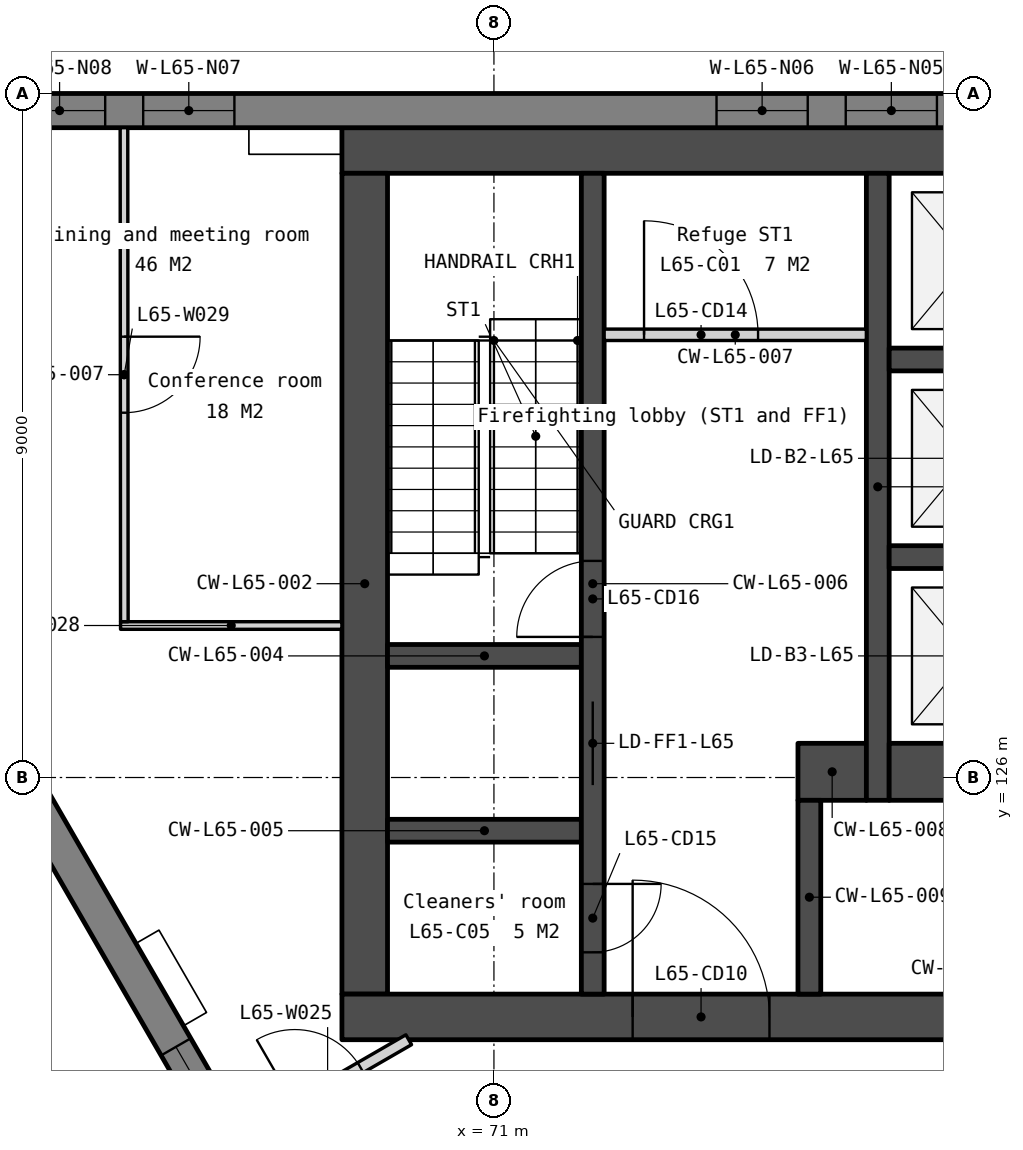
"""IFC4 building model, lengths in metres.
Left out: names, types, materials, properties, quantities, classifications, styles, units other than length and angle.
Written with IfcOpenShell. Run it as: python <this file> out.ifc"""

import sys

from ifc_helpers import new_model, si_unit, direction, frame, frame_2d, origin, place, context, subcontext, project, spatial, polyline, rectangle, outline, extrude, element, fill, save


model = new_model("IFC4")
c1 = context("Model", 3, precision=1e-05, world=origin(), true_north=direction((0.0, 1.0)))
c2 = subcontext(c1, "Body", "Model", "MODEL_VIEW")
j1 = project(units=[si_unit("LENGTHUNIT", "METRE"), si_unit("PLANEANGLEUNIT", "RADIAN")], contexts=[c1])
p1 = place(None, origin())
s1 = spatial("IfcSite", under=j1, at=p1, CompositionType="ELEMENT")
p2 = place(p1, origin())
s2 = spatial("IfcBuilding", under=s1, at=p2, CompositionType="ELEMENT")
p3 = place(p2, frame((0.0, 0.0, 266.0)))
s3 = spatial("IfcBuildingStorey", under=s2, at=p3, CompositionType="ELEMENT", Elevation=266.0)
p4 = place(p3, frame((69.0, 134.25, 0.0), z_axis=(0.0, 0.0, 1.0), x_axis=(1.0, 0.0, 0.0)))
e1 = element("IfcWall", 1, at=p4, inside=s3, PredefinedType="SOLIDWALL", context=c2, shape_type="SweptSolid", body=[
    extrude(rectangle(XDim=22.0, YDim=0.6, at=frame_2d((11.0, 0.0))), origin(), (0.0, 0.0, 1.0), 3.75),
])
p5 = place(p3, frame((69.3, 133.95, 0.0), z_axis=(0.0, 0.0, 1.0), x_axis=(0.0, -1.0, 0.0)))
e2 = element("IfcWall", 2, at=p5, inside=s3, PredefinedType="SOLIDWALL", context=c2, shape_type="SweptSolid", body=[
    extrude(rectangle(XDim=10.8, YDim=0.6, at=frame_2d((5.4, 0.0))), origin(), (0.0, 0.0, 1.0), 3.75),
])
p6 = place(p3, frame((69.0, 122.85, 0.0), z_axis=(0.0, 0.0, 1.0), x_axis=(1.0, 0.0, 0.0)))
e3 = element("IfcWall", 3, at=p6, inside=s3, PredefinedType="SOLIDWALL", context=c2, shape_type="SweptSolid", body=[
    extrude(rectangle(XDim=22.0, YDim=0.6, at=frame_2d((11.0, 0.0))), origin(), (0.0, 0.0, 1.0), 3.75),
])
p7 = place(p6, frame((16.375, 0.0, 0.0)))
e4 = element("IfcOpeningElement", 4, at=p7, cuts=e3, PredefinedType="OPENING", context=c2, shape_type="SweptSolid", body=[
    extrude(rectangle(XDim=1.8, YDim=2.1, at=frame_2d((0.9, 1.05))), frame((0.0, 0.31, 0.0), z_axis=(0.0, -1.0, 0.0), x_axis=(1.0, 0.0, 0.0)), (0.0, 0.0, 1.0), 0.62),
])
p8 = place(p6, frame((3.825, 0.0, 0.0)))
e5 = element("IfcOpeningElement", 5, at=p8, cuts=e3, PredefinedType="OPENING", context=c2, shape_type="SweptSolid", body=[
    extrude(rectangle(XDim=1.8, YDim=2.1, at=frame_2d((0.9, 1.05))), frame((0.0, 0.31, 0.0), z_axis=(0.0, -1.0, 0.0), x_axis=(1.0, 0.0, 0.0)), (0.0, 0.0, 1.0), 0.62),
])
p9 = place(p6, frame((12.85, 0.0, 0.0)))
e6 = element("IfcOpeningElement", 6, at=p9, cuts=e3, PredefinedType="OPENING", context=c2, shape_type="SweptSolid", body=[
    extrude(rectangle(XDim=1.5, YDim=2.1, at=frame_2d((0.75, 1.05))), frame((0.0, 0.31, 0.0), z_axis=(0.0, -1.0, 0.0), x_axis=(1.0, 0.0, 0.0)), (0.0, 0.0, 1.0), 0.62),
])
for number, where, z_axis, x_axis in (
    (7, (69.6, 127.6, 0.0), (0.0, 0.0, 1.0), (1.0, 0.0, 0.0)),
    (8, (69.6, 125.3, 0.0), (0.0, 0.0, 1.0), (1.0, 0.0, 0.0)),
):
    element("IfcWall", number, at=place(p3, frame(where, z_axis=z_axis, x_axis=x_axis)), inside=s3, PredefinedType="SOLIDWALL", context=c2, shape_type="SweptSolid", body=[
        extrude(rectangle(XDim=2.55, YDim=0.3, at=frame_2d((1.275, 0.0))), origin(), (0.0, 0.0, 1.0), 3.75),
    ])
p10 = place(p3, frame((72.3, 133.95, 0.0), z_axis=(0.0, 0.0, 1.0), x_axis=(0.0, -1.0, 0.0)))
e9 = element("IfcWall", 9, at=p10, inside=s3, PredefinedType="SOLIDWALL", context=c2, shape_type="SweptSolid", body=[
    extrude(rectangle(XDim=10.8, YDim=0.3, at=frame_2d((5.4, 0.0))), origin(), (0.0, 0.0, 1.0), 3.75),
])
p11 = place(p10, frame((6.95, 0.0, 0.0)))
e10 = element("IfcOpeningElement", 10, at=p11, cuts=e9, PredefinedType="OPENING", context=c2, shape_type="SweptSolid", body=[
    extrude(rectangle(XDim=1.1, YDim=2.1, at=frame_2d((0.55, 1.05))), frame((0.0, 0.16, 0.0), z_axis=(0.0, -1.0, 0.0), x_axis=(1.0, 0.0, 0.0)), (0.0, 0.0, 1.0), 0.32),
])
p12 = place(p10, frame((9.35, 0.0, 0.0)))
e11 = element("IfcOpeningElement", 11, at=p12, cuts=e9, PredefinedType="OPENING", context=c2, shape_type="SweptSolid", body=[
    extrude(rectangle(XDim=0.9, YDim=2.1, at=frame_2d((0.45, 1.05))), frame((0.0, 0.16, 0.0), z_axis=(0.0, -1.0, 0.0), x_axis=(1.0, 0.0, 0.0)), (0.0, 0.0, 1.0), 0.32),
])
p13 = place(p10, frame((5.1, 0.0, 0.0)))
e12 = element("IfcOpeningElement", 12, at=p13, cuts=e9, PredefinedType="OPENING", context=c2, shape_type="SweptSolid", body=[
    extrude(rectangle(XDim=1.0, YDim=2.1, at=frame_2d((0.5, 1.05))), frame((0.0, 0.16, 0.0), z_axis=(0.0, -1.0, 0.0), x_axis=(1.0, 0.0, 0.0)), (0.0, 0.0, 1.0), 0.32),
])
p14 = place(p3, frame((72.45, 131.825, 0.0), z_axis=(0.0, 0.0, 1.0), x_axis=(1.0, 0.0, 0.0)))
e13 = element("IfcWall", 13, at=p14, inside=s3, PredefinedType="PARTITIONING", context=c2, shape_type="SweptSolid", body=[
    extrude(rectangle(XDim=3.45, YDim=0.15, at=frame_2d((1.725, 0.0))), origin(), (0.0, 0.0, 1.0), 3.75),
])
p15 = place(p14, frame((0.525, 0.0, 0.0)))
e14 = element("IfcOpeningElement", 14, at=p15, cuts=e13, PredefinedType="OPENING", context=c2, shape_type="SweptSolid", body=[
    extrude(rectangle(XDim=1.5, YDim=2.1, at=frame_2d((0.75, 1.05))), frame((0.0, 0.085, 0.0), z_axis=(0.0, -1.0, 0.0), x_axis=(1.0, 0.0, 0.0)), (0.0, 0.0, 1.0), 0.17),
])
p16 = place(p3, frame((75.0, 126.075, 0.0), z_axis=(0.0, 0.0, 1.0), x_axis=(1.0, 0.0, 0.0)))
e15 = element("IfcWall", 15, at=p16, inside=s3, PredefinedType="SOLIDWALL", context=c2, shape_type="SweptSolid", body=[
    extrude(rectangle(XDim=0.9, YDim=0.75, at=frame_2d((0.45, 0.0))), origin(), (0.0, 0.0, 1.0), 3.75),
])
p17 = place(p3, frame((75.15, 125.7, 0.0), z_axis=(0.0, 0.0, 1.0), x_axis=(0.0, -1.0, 0.0)))
e16 = element("IfcWall", 16, at=p17, inside=s3, PredefinedType="SOLIDWALL", context=c2, shape_type="SweptSolid", body=[
    extrude(rectangle(XDim=2.55, YDim=0.3, at=frame_2d((1.275, 0.0))), origin(), (0.0, 0.0, 1.0), 3.75),
])
p18 = place(p3, frame((76.05, 133.95, 0.0), z_axis=(0.0, 0.0, 1.0), x_axis=(0.0, -1.0, 0.0)))
e17 = element("IfcWall", 17, at=p18, inside=s3, PredefinedType="SOLIDWALL", context=c2, shape_type="SweptSolid", body=[
    extrude(rectangle(XDim=8.25, YDim=0.3, at=frame_2d((4.125, 0.0))), origin(), (0.0, 0.0, 1.0), 3.75),
])
for number, where, z_axis, x_axis in (
    (18, (76.2, 131.5, 0.0), (0.0, 0.0, 1.0), (1.0, 0.0, 0.0)),
    (19, (76.2, 128.9, 0.0), (0.0, 0.0, 1.0), (1.0, 0.0, 0.0)),
):
    element("IfcWall", number, at=place(p3, frame(where, z_axis=z_axis, x_axis=x_axis)), inside=s3, PredefinedType="SOLIDWALL", context=c2, shape_type="SweptSolid", body=[
        extrude(rectangle(XDim=2.1, YDim=0.3, at=frame_2d((1.05, 0.0))), origin(), (0.0, 0.0, 1.0), 3.75),
    ])
p19 = place(p3, frame((76.2, 126.075, 0.0), z_axis=(0.0, 0.0, 1.0), x_axis=(1.0, 0.0, 0.0)))
e20 = element("IfcWall", 20, at=p19, inside=s3, PredefinedType="SOLIDWALL", context=c2, shape_type="SweptSolid", body=[
    extrude(rectangle(XDim=2.1, YDim=0.75, at=frame_2d((1.05, 0.0))), origin(), (0.0, 0.0, 1.0), 3.75),
])
p20 = place(p3, frame((98.486, 134.775, -0.15), z_axis=(0.0, 0.0, 1.0), x_axis=(-1.0, 0.0, 0.0)))
e21 = element("IfcWall", 21, at=p20, inside=s3, PredefinedType="SOLIDWALL", context=c2, shape_type="SweptSolid", body=[
    extrude(outline(polyline([(36.972, 0.0), (36.972, 3.9), (0.0, 3.9), (0.0, 0.0), (36.972, 0.0)])), frame((0.0, 0.225, 0.0), z_axis=(0.0, -1.0, 0.0), x_axis=(1.0, 0.0, 0.0)), (0.0, 0.0, 1.0), 0.45),
])
p21 = place(p20, frame((3.172, 0.0, 0.95)))
e22 = element("IfcOpeningElement", 22, at=p21, cuts=e21, PredefinedType="OPENING", context=c2, shape_type="SweptSolid", body=[
    extrude(rectangle(XDim=1.2, YDim=2.2, at=frame_2d((0.6, 1.1))), frame((0.0, 0.235, 0.0), z_axis=(0.0, -1.0, 0.0), x_axis=(1.0, 0.0, 0.0)), (0.0, 0.0, 1.0), 0.47),
])
p22 = place(p20, frame((4.872, 0.0, 0.95)))
e23 = element("IfcOpeningElement", 23, at=p22, cuts=e21, PredefinedType="OPENING", context=c2, shape_type="SweptSolid", body=[
    extrude(rectangle(XDim=1.2, YDim=2.2, at=frame_2d((0.6, 1.1))), frame((0.0, 0.235, 0.0), z_axis=(0.0, -1.0, 0.0), x_axis=(1.0, 0.0, 0.0)), (0.0, 0.0, 1.0), 0.47),
])
p23 = place(p20, frame((12.415, 0.0, 0.95)))
e24 = element("IfcOpeningElement", 24, at=p23, cuts=e21, PredefinedType="OPENING", context=c2, shape_type="SweptSolid", body=[
    extrude(rectangle(XDim=1.2, YDim=2.2, at=frame_2d((0.6, 1.1))), frame((0.0, 0.235, 0.0), z_axis=(0.0, -1.0, 0.0), x_axis=(1.0, 0.0, 0.0)), (0.0, 0.0, 1.0), 0.47),
])
p24 = place(p20, frame((14.115, 0.0, 0.95)))
e25 = element("IfcOpeningElement", 25, at=p24, cuts=e21, PredefinedType="OPENING", context=c2, shape_type="SweptSolid", body=[
    extrude(rectangle(XDim=1.2, YDim=2.2, at=frame_2d((0.6, 1.1))), frame((0.0, 0.235, 0.0), z_axis=(0.0, -1.0, 0.0), x_axis=(1.0, 0.0, 0.0)), (0.0, 0.0, 1.0), 0.47),
])
p25 = place(p20, frame((21.658, 0.0, 0.95)))
e26 = element("IfcOpeningElement", 26, at=p25, cuts=e21, PredefinedType="OPENING", context=c2, shape_type="SweptSolid", body=[
    extrude(rectangle(XDim=1.2, YDim=2.2, at=frame_2d((0.6, 1.1))), frame((0.0, 0.235, 0.0), z_axis=(0.0, -1.0, 0.0), x_axis=(1.0, 0.0, 0.0)), (0.0, 0.0, 1.0), 0.47),
])
p26 = place(p20, frame((23.358, 0.0, 0.95)))
e27 = element("IfcOpeningElement", 27, at=p26, cuts=e21, PredefinedType="OPENING", context=c2, shape_type="SweptSolid", body=[
    extrude(rectangle(XDim=1.2, YDim=2.2, at=frame_2d((0.6, 1.1))), frame((0.0, 0.235, 0.0), z_axis=(0.0, -1.0, 0.0), x_axis=(1.0, 0.0, 0.0)), (0.0, 0.0, 1.0), 0.47),
])
p27 = place(p20, frame((30.901, 0.0, 0.95)))
e28 = element("IfcOpeningElement", 28, at=p27, cuts=e21, PredefinedType="OPENING", context=c2, shape_type="SweptSolid", body=[
    extrude(rectangle(XDim=1.2, YDim=2.2, at=frame_2d((0.6, 1.1))), frame((0.0, 0.235, 0.0), z_axis=(0.0, -1.0, 0.0), x_axis=(1.0, 0.0, 0.0)), (0.0, 0.0, 1.0), 0.47),
])
p28 = place(p20, frame((32.601, 0.0, 0.95)))
e29 = element("IfcOpeningElement", 29, at=p28, cuts=e21, PredefinedType="OPENING", context=c2, shape_type="SweptSolid", body=[
    extrude(rectangle(XDim=1.2, YDim=2.2, at=frame_2d((0.6, 1.1))), frame((0.0, 0.235, 0.0), z_axis=(0.0, -1.0, 0.0), x_axis=(1.0, 0.0, 0.0)), (0.0, 0.0, 1.0), 0.47),
])
p29 = place(p3, frame((60.609, 133.207, -0.15), z_axis=(0.0, 0.0, 1.0), x_axis=(0.500002536638, -0.866023939251, 0.0)))
e30 = element("IfcWall", 30, at=p29, inside=s3, PredefinedType="SOLIDWALL", context=c2, shape_type="SweptSolid", body=[
    extrude(outline(polyline([(36.972, 0.0), (36.972, 3.9), (0.0, 3.9), (0.0, 0.0), (36.972, 0.0)])), frame((0.0, 0.225, 0.0), z_axis=(0.0, -1.0, 0.0), x_axis=(1.0, 0.0, 0.0)), (0.0, 0.0, 1.0), 0.45),
])
p30 = place(p29, frame((3.172, 0.0, 0.95)))
e31 = element("IfcOpeningElement", 31, at=p30, cuts=e30, PredefinedType="OPENING", context=c2, shape_type="SweptSolid", body=[
    extrude(rectangle(XDim=1.2, YDim=2.2, at=frame_2d((0.6, 1.1))), frame((0.0, 0.235, 0.0), z_axis=(0.0, -1.0, 0.0), x_axis=(1.0, 0.0, 0.0)), (0.0, 0.0, 1.0), 0.47),
])
p31 = place(p29, frame((4.872, 0.0, 0.95)))
e32 = element("IfcOpeningElement", 32, at=p31, cuts=e30, PredefinedType="OPENING", context=c2, shape_type="SweptSolid", body=[
    extrude(rectangle(XDim=1.2, YDim=2.2, at=frame_2d((0.6, 1.1))), frame((0.0, 0.235, 0.0), z_axis=(0.0, -1.0, 0.0), x_axis=(1.0, 0.0, 0.0)), (0.0, 0.0, 1.0), 0.47),
])
p32 = place(p29, frame((12.415, 0.0, 0.95)))
e33 = element("IfcOpeningElement", 33, at=p32, cuts=e30, PredefinedType="OPENING", context=c2, shape_type="SweptSolid", body=[
    extrude(rectangle(XDim=1.2, YDim=2.2, at=frame_2d((0.6, 1.1))), frame((0.0, 0.235, 0.0), z_axis=(0.0, -1.0, 0.0), x_axis=(1.0, 0.0, 0.0)), (0.0, 0.0, 1.0), 0.47),
])
p33 = place(p29, frame((14.115, 0.0, 0.95)))
e34 = element("IfcOpeningElement", 34, at=p33, cuts=e30, PredefinedType="OPENING", context=c2, shape_type="SweptSolid", body=[
    extrude(rectangle(XDim=1.2, YDim=2.2, at=frame_2d((0.6, 1.1))), frame((0.0, 0.235, 0.0), z_axis=(0.0, -1.0, 0.0), x_axis=(1.0, 0.0, 0.0)), (0.0, 0.0, 1.0), 0.47),
])
p34 = place(p29, frame((21.658, 0.0, 0.95)))
e35 = element("IfcOpeningElement", 35, at=p34, cuts=e30, PredefinedType="OPENING", context=c2, shape_type="SweptSolid", body=[
    extrude(rectangle(XDim=1.2, YDim=2.2, at=frame_2d((0.6, 1.1))), frame((0.0, 0.235, 0.0), z_axis=(0.0, -1.0, 0.0), x_axis=(1.0, 0.0, 0.0)), (0.0, 0.0, 1.0), 0.47),
])
p35 = place(p29, frame((23.358, 0.0, 0.95)))
e36 = element("IfcOpeningElement", 36, at=p35, cuts=e30, PredefinedType="OPENING", context=c2, shape_type="SweptSolid", body=[
    extrude(rectangle(XDim=1.2, YDim=2.2, at=frame_2d((0.6, 1.1))), frame((0.0, 0.235, 0.0), z_axis=(0.0, -1.0, 0.0), x_axis=(1.0, 0.0, 0.0)), (0.0, 0.0, 1.0), 0.47),
])
p36 = place(p29, frame((30.901, 0.0, 0.95)))
e37 = element("IfcOpeningElement", 37, at=p36, cuts=e30, PredefinedType="OPENING", context=c2, shape_type="SweptSolid", body=[
    extrude(rectangle(XDim=1.2, YDim=2.2, at=frame_2d((0.6, 1.1))), frame((0.0, 0.235, 0.0), z_axis=(0.0, -1.0, 0.0), x_axis=(1.0, 0.0, 0.0)), (0.0, 0.0, 1.0), 0.47),
])
p37 = place(p29, frame((32.601, 0.0, 0.95)))
e38 = element("IfcOpeningElement", 38, at=p37, cuts=e30, PredefinedType="OPENING", context=c2, shape_type="SweptSolid", body=[
    extrude(rectangle(XDim=1.2, YDim=2.2, at=frame_2d((0.6, 1.1))), frame((0.0, 0.235, 0.0), z_axis=(0.0, -1.0, 0.0), x_axis=(1.0, 0.0, 0.0)), (0.0, 0.0, 1.0), 0.47),
])
p38 = place(p3, frame((67.745, 121.318, 0.0), z_axis=(0.0, 0.0, 1.0), x_axis=(0.865990916707, 0.500059728613, 0.0)))
e39 = element("IfcWall", 39, at=p38, inside=s3, PredefinedType="PARTITIONING", context=c2, shape_type="SweptSolid", body=[
    extrude(rectangle(XDim=2.465, YDim=0.15, at=frame_2d((1.232, 0.0))), origin(), (0.0, 0.0, 1.0), 3.75),
])
p39 = place(p38, frame((0.732, 0.0, 0.0)))
e40 = element("IfcOpeningElement", 40, at=p39, cuts=e39, PredefinedType="OPENING", context=c2, shape_type="SweptSolid", body=[
    extrude(rectangle(XDim=1.0, YDim=2.1, at=frame_2d((0.5, 1.05))), frame((0.0, 0.085, 0.0), z_axis=(0.0, -1.0, 0.0), x_axis=(1.0, 0.0, 0.0)), (0.0, 0.0, 1.0), 0.17),
])
p40 = place(p3, frame((66.087, 128.0, 0.0), z_axis=(0.0, 0.0, 1.0), x_axis=(1.0, 0.0, 0.0)))
e41 = element("IfcWall", 41, at=p40, inside=s3, PredefinedType="PARTITIONING", context=c2, shape_type="SweptSolid", body=[
    extrude(rectangle(XDim=2.913, YDim=0.1, at=frame_2d((1.456, 0.0))), origin(), (0.0, 0.0, 1.0), 3.75),
])
p41 = place(p3, frame((66.132, 134.55, 0.0), z_axis=(0.0, 0.0, 1.0), x_axis=(0.000788761774, -0.999999688927, 0.0)))
e42 = element("IfcWall", 42, at=p41, inside=s3, PredefinedType="PARTITIONING", context=c2, shape_type="SweptSolid", body=[
    extrude(rectangle(XDim=6.5, YDim=0.1, at=frame_2d((3.25, 0.0))), origin(), (0.0, 0.0, 1.0), 3.75),
])
p42 = place(p41, frame((2.75, 0.0, 0.0)))
e43 = element("IfcOpeningElement", 43, at=p42, cuts=e42, PredefinedType="OPENING", context=c2, shape_type="SweptSolid", body=[
    extrude(rectangle(XDim=1.0, YDim=2.1, at=frame_2d((0.5, 1.05))), frame((0.0, 0.06, 0.0), z_axis=(0.0, -1.0, 0.0), x_axis=(1.0, 0.0, 0.0)), (0.0, 0.0, 1.0), 0.12),
])
p43 = place(p11, origin())
e44 = element("IfcDoor", 44, at=p43, inside=s3, OperationType="SLIDING_TO_LEFT", PredefinedType="DOOR", context=c2, shape_type="SweptSolid", body=[
    extrude(rectangle(XDim=1.1, YDim=2.1, at=frame_2d((0.55, 1.05))), frame((0.0, 0.025, 0.0), z_axis=(0.0, -1.0, 0.0), x_axis=(1.0, 0.0, 0.0)), (0.0, 0.0, 1.0), 0.05),
])
fill(e10, e44)
p44 = place(p8, origin())
e45 = element("IfcDoor", 45, at=p44, inside=s3, OperationType="DOUBLE_DOOR_DOUBLE_SWING", PredefinedType="DOOR", context=c2, shape_type="SweptSolid", body=[
    extrude(rectangle(XDim=1.8, YDim=2.1, at=frame_2d((0.9, 1.05))), frame((0.0, 0.025, 0.0), z_axis=(0.0, -1.0, 0.0), x_axis=(1.0, 0.0, 0.0)), (0.0, 0.0, 1.0), 0.05),
])
fill(e5, e45)
p45 = place(p15, origin())
e46 = element("IfcDoor", 46, at=p45, inside=s3, OperationType="DOUBLE_DOOR_DOUBLE_SWING", PredefinedType="DOOR", context=c2, shape_type="SweptSolid", body=[
    extrude(rectangle(XDim=1.5, YDim=2.1, at=frame_2d((0.75, 1.05))), frame((0.0, 0.025, 0.0), z_axis=(0.0, -1.0, 0.0), x_axis=(1.0, 0.0, 0.0)), (0.0, 0.0, 1.0), 0.05),
])
fill(e14, e46)
p46 = place(p12, origin())
e47 = element("IfcDoor", 47, at=p46, inside=s3, OperationType="SINGLE_SWING_LEFT", PredefinedType="DOOR", context=c2, shape_type="SweptSolid", body=[
    extrude(rectangle(XDim=0.9, YDim=2.1, at=frame_2d((0.45, 1.05))), frame((0.0, 0.025, 0.0), z_axis=(0.0, -1.0, 0.0), x_axis=(1.0, 0.0, 0.0)), (0.0, 0.0, 1.0), 0.05),
])
fill(e11, e47)
p47 = place(p13, origin())
e48 = element("IfcDoor", 48, at=p47, inside=s3, OperationType="SINGLE_SWING_RIGHT", PredefinedType="DOOR", context=c2, shape_type="SweptSolid", body=[
    extrude(rectangle(XDim=1.0, YDim=2.1, at=frame_2d((0.5, 1.05))), frame((0.0, 0.025, 0.0), z_axis=(0.0, -1.0, 0.0), x_axis=(1.0, 0.0, 0.0)), (0.0, 0.0, 1.0), 0.05),
])
fill(e12, e48)
p48 = place(p25, origin())
e49 = element("IfcWindow", 49, at=p48, inside=s3, PartitioningType="SINGLE_PANEL", PredefinedType="WINDOW", context=c2, shape_type="SweptSolid", body=[
    extrude(rectangle(XDim=1.2, YDim=2.2, at=frame_2d((0.6, 1.1))), frame((0.0, 0.03, 0.0), z_axis=(0.0, -1.0, 0.0), x_axis=(1.0, 0.0, 0.0)), (0.0, 0.0, 1.0), 0.06),
])
fill(e26, e49)
p49 = place(p26, origin())
e50 = element("IfcWindow", 50, at=p49, inside=s3, PartitioningType="SINGLE_PANEL", PredefinedType="WINDOW", context=c2, shape_type="SweptSolid", body=[
    extrude(rectangle(XDim=1.2, YDim=2.2, at=frame_2d((0.6, 1.1))), frame((0.0, 0.03, 0.0), z_axis=(0.0, -1.0, 0.0), x_axis=(1.0, 0.0, 0.0)), (0.0, 0.0, 1.0), 0.06),
])
fill(e27, e50)
p50 = place(p27, origin())
e51 = element("IfcWindow", 51, at=p50, inside=s3, PartitioningType="SINGLE_PANEL", PredefinedType="WINDOW", context=c2, shape_type="SweptSolid", body=[
    extrude(rectangle(XDim=1.2, YDim=2.2, at=frame_2d((0.6, 1.1))), frame((0.0, 0.03, 0.0), z_axis=(0.0, -1.0, 0.0), x_axis=(1.0, 0.0, 0.0)), (0.0, 0.0, 1.0), 0.06),
])
fill(e28, e51)
p51 = place(p28, origin())
e52 = element("IfcWindow", 52, at=p51, inside=s3, PartitioningType="SINGLE_PANEL", PredefinedType="WINDOW", context=c2, shape_type="SweptSolid", body=[
    extrude(rectangle(XDim=1.2, YDim=2.2, at=frame_2d((0.6, 1.1))), frame((0.0, 0.03, 0.0), z_axis=(0.0, -1.0, 0.0), x_axis=(1.0, 0.0, 0.0)), (0.0, 0.0, 1.0), 0.06),
])
fill(e29, e52)
p52 = place(p32, origin())
e53 = element("IfcWindow", 53, at=p52, inside=s3, PartitioningType="SINGLE_PANEL", PredefinedType="WINDOW", context=c2, shape_type="SweptSolid", body=[
    extrude(rectangle(XDim=1.2, YDim=2.2, at=frame_2d((0.6, 1.1))), frame((0.0, 0.03, 0.0), z_axis=(0.0, -1.0, 0.0), x_axis=(1.0, 0.0, 0.0)), (0.0, 0.0, 1.0), 0.06),
])
fill(e33, e53)
p53 = place(p42, origin())
e54 = element("IfcDoor", 54, at=p53, inside=s3, OperationType="SINGLE_SWING_LEFT", PredefinedType="DOOR", context=c2, shape_type="SweptSolid", body=[
    extrude(rectangle(XDim=1.0, YDim=2.1, at=frame_2d((0.5, 1.05))), frame((0.0, 0.025, 0.0), z_axis=(0.0, -1.0, 0.0), x_axis=(1.0, 0.0, 0.0)), (0.0, 0.0, 1.0), 0.05),
])
fill(e43, e54)
p54 = place(p39, origin())
e55 = element("IfcDoor", 55, at=p54, inside=s3, OperationType="SINGLE_SWING_LEFT", PredefinedType="DOOR", context=c2, shape_type="SweptSolid", body=[
    extrude(rectangle(XDim=1.0, YDim=2.1, at=frame_2d((0.5, 1.05))), frame((0.0, 0.025, 0.0), z_axis=(0.0, -1.0, 0.0), x_axis=(1.0, 0.0, 0.0)), (0.0, 0.0, 1.0), 0.05),
])
fill(e40, e55)
save(model, sys.argv[1])
